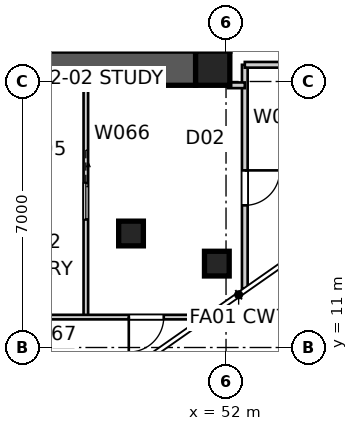
"""IFC4 building model, lengths in metres.
Left out: names, types, materials, properties, quantities, classifications, styles, units other than length and angle.
Written with IfcOpenShell. Run it as: python <this file> out.ifc"""

import sys

from ifc_helpers import new_model, si_unit, direction, frame, frame_2d, origin, origin_2d, place, context, subcontext, project, spatial, polyline, rectangle, outline, extrude, element, fill, save


model = new_model("IFC4")
c1 = context("Model", 3, precision=1e-05, world=origin(), true_north=direction((0.0, 1.0)))
c2 = subcontext(c1, "Body", "Model", "MODEL_VIEW")
j1 = project(units=[si_unit("LENGTHUNIT", "METRE"), si_unit("PLANEANGLEUNIT", "RADIAN")], contexts=[c1])
p1 = place(None, origin())
s1 = spatial("IfcSite", under=j1, at=p1, CompositionType="ELEMENT")
p2 = place(p1, origin())
s2 = spatial("IfcBuilding", under=s1, at=p2, CompositionType="ELEMENT")
p3 = place(p2, frame((0.0, 0.0, 260.8)))
s3 = spatial("IfcBuildingStorey", under=s2, at=p3, CompositionType="ELEMENT", Elevation=260.8)
p4 = place(p3, frame((51.2, 18.35, 0.0), z_axis=(0.0, 0.0, 1.0), x_axis=(-1.0, 0.0, 0.0)))
e1 = element("IfcWall", 1, at=p4, inside=s3, PredefinedType="SHEAR", context=c2, shape_type="SweptSolid", body=[
    extrude(outline(polyline([(0.0, -0.45), (22.4, -0.45), (22.4, -0.025), (22.85, -0.025), (22.85, 0.025), (22.4, 0.025), (22.4, 0.45), (0.0, 0.45), (0.0, 0.025), (-0.45, 0.025), (-0.45, -0.025), (0.0, -0.025), (0.0, -0.45)])), origin(), (0.0, 0.0, 1.0), 3.4),
])
p5 = place(p3, frame((51.65, 18.8, 0.0), z_axis=(0.0, 0.0, 1.0), x_axis=(0.0, 1.0, 0.0)))
e2 = element("IfcWall", 2, at=p5, inside=s3, PredefinedType="SHEAR", context=c2, shape_type="SweptSolid", body=[
    extrude(outline(polyline([(0.0, -0.45), (22.4, -0.45), (22.4, -0.025), (22.85, -0.025), (22.85, 0.025), (22.4, 0.025), (22.4, 0.45), (0.0, 0.45), (0.0, 0.025), (-0.45, 0.025), (-0.45, -0.025), (0.0, -0.025), (0.0, -0.45)])), origin(), (0.0, 0.0, 1.0), 3.4),
])
p6 = place(p5, frame((11.14, 0.0, 0.0)))
e3 = element("IfcOpeningElement", 3, at=p6, cuts=e2, PredefinedType="OPENING", context=c2, shape_type="SweptSolid", body=[
    extrude(rectangle(XDim=1.02, YDim=2.4, at=frame_2d((0.51, 1.2))), frame((0.0, 0.46, 0.0), z_axis=(0.0, -1.0, 0.0), x_axis=(1.0, 0.0, 0.0)), (0.0, 0.0, 1.0), 0.92),
])
p7 = place(p3, frame((51.65, 18.35, 0.0), z_axis=(0.0, 0.0, 1.0), x_axis=(1.0, 0.0, 0.0)))
e4 = element("IfcColumn", 4, at=p7, inside=s3, PredefinedType="COLUMN", context=c2, shape_type="SweptSolid", body=[
    extrude(rectangle(XDim=0.9, YDim=0.9, at=origin_2d()), origin(), (0.0, 0.0, 1.0), 3.4),
])
for number, where, z_axis, x_axis in (
    (5, (51.758, 13.207, 0.0), (0.0, 0.0, 1.0), (1.0, 0.0, 0.0)),
    (6, (49.5, 14.0, 0.0), (0.0, 0.0, 1.0), (1.0, 0.0, 0.0)),
):
    element("IfcColumn", number, at=place(p3, frame(where, z_axis=z_axis, x_axis=x_axis)), inside=s3, PredefinedType="COLUMN", context=c2, shape_type="SweptSolid", body=[
        extrude(rectangle(XDim=0.65, YDim=0.65, at=origin_2d()), origin(), (0.0, 0.0, 1.0), 3.4),
    ])
p8 = place(p3, frame((48.311, 17.9, 0.0), z_axis=(0.0, 0.0, 1.0), x_axis=(0.0, -1.0, 0.0)))
e7 = element("IfcWall", 7, at=p8, inside=s3, PredefinedType="PARTITIONING", context=c2, shape_type="SweptSolid", body=[
    extrude(rectangle(XDim=6.1, YDim=0.12, at=frame_2d((3.05, 0.0))), origin(), (0.0, 0.0, 1.0), 3.25),
])
p9 = place(p8, frame((2.57, 0.0, 0.0)))
e8 = element("IfcOpeningElement", 8, at=p9, cuts=e7, PredefinedType="OPENING", context=c2, shape_type="SweptSolid", body=[
    extrude(rectangle(XDim=0.96, YDim=2.1, at=frame_2d((0.48, 1.05))), frame((0.0, 0.07, 0.0), z_axis=(0.0, -1.0, 0.0), x_axis=(1.0, 0.0, 0.0)), (0.0, 0.0, 1.0), 0.14),
])
p10 = place(p3, frame((51.422, 11.8, 0.0), z_axis=(0.0, 0.0, 1.0), x_axis=(-1.0, 0.0, 0.0)))
e9 = element("IfcWall", 9, at=p10, inside=s3, PredefinedType="PARTITIONING", context=c2, shape_type="SweptSolid", body=[
    extrude(rectangle(XDim=6.213, YDim=0.12, at=frame_2d((3.106, 0.0))), origin(), (0.0, 0.0, 1.0), 3.25),
])
p11 = place(p10, frame((1.061, 0.0, 0.0)))
e10 = element("IfcOpeningElement", 10, at=p11, cuts=e9, PredefinedType="OPENING", context=c2, shape_type="SweptSolid", body=[
    extrude(rectangle(XDim=0.92, YDim=2.1, at=frame_2d((0.46, 1.05))), frame((0.0, 0.07, 0.0), z_axis=(0.0, -1.0, 0.0), x_axis=(1.0, 0.0, 0.0)), (0.0, 0.0, 1.0), 0.14),
])
p12 = place(p3, frame((52.494, 18.439, 0.0), z_axis=(0.0, 0.0, 1.0), x_axis=(0.0, -1.0, 0.0)))
e11 = element("IfcWall", 11, at=p12, inside=s3, PredefinedType="SOLIDWALL", context=c2, shape_type="SweptSolid", body=[
    extrude(rectangle(XDim=5.888, YDim=0.15, at=frame_2d((2.944, 0.0))), origin(), (0.0, 0.0, 1.0), 3.25),
])
p13 = place(p12, frame((2.778, 0.0, 0.0)))
e12 = element("IfcOpeningElement", 12, at=p13, cuts=e11, PredefinedType="OPENING", context=c2, shape_type="SweptSolid", body=[
    extrude(rectangle(XDim=0.92, YDim=2.34, at=frame_2d((0.46, 1.17))), frame((0.0, 0.085, 0.0), z_axis=(0.0, -1.0, 0.0), x_axis=(1.0, 0.0, 0.0)), (0.0, 0.0, 1.0), 0.17),
])
p14 = place(p3, frame((52.05, 17.9, 0.0), z_axis=(0.0, 0.0, 1.0), x_axis=(1.0, 0.0, 0.0)))
e13 = element("IfcWall", 13, at=p14, inside=s3, PredefinedType="SOLIDWALL", context=c2, shape_type="SweptSolid", body=[
    extrude(rectangle(XDim=0.444, YDim=0.15, at=frame_2d((0.222, 0.0))), origin(), (0.0, 0.0, 1.0), 3.25),
])
p15 = place(p3, frame((52.494, 18.439, 0.0), z_axis=(0.0, 0.0, 1.0), x_axis=(1.0, 0.0, 0.0)))
e14 = element("IfcWall", 14, at=p15, inside=s3, PredefinedType="SOLIDWALL", context=c2, shape_type="SweptSolid", body=[
    extrude(rectangle(XDim=5.706, YDim=0.15, at=frame_2d((2.853, 0.0))), origin(), (0.0, 0.0, 1.0), 3.25),
])
p16 = place(p15, frame((2.393, 0.0, 0.0)))
e15 = element("IfcOpeningElement", 15, at=p16, cuts=e14, PredefinedType="OPENING", context=c2, shape_type="SweptSolid", body=[
    extrude(rectangle(XDim=0.92, YDim=2.34, at=frame_2d((0.46, 1.17))), frame((0.0, 0.085, 0.0), z_axis=(0.0, -1.0, 0.0), x_axis=(1.0, 0.0, 0.0)), (0.0, 0.0, 1.0), 0.17),
])
p17 = place(p13, origin())
e16 = element("IfcDoor", 16, at=p17, inside=s3, OperationType="SINGLE_SWING_LEFT", PredefinedType="DOOR", context=c2, shape_type="SweptSolid", body=[
    extrude(rectangle(XDim=0.92, YDim=2.34, at=frame_2d((0.46, 1.17))), frame((0.0, 0.025, 0.0), z_axis=(0.0, -1.0, 0.0), x_axis=(1.0, 0.0, 0.0)), (0.0, 0.0, 1.0), 0.05),
])
fill(e12, e16)
p18 = place(p9, origin())
e17 = element("IfcDoor", 17, at=p18, inside=s3, OperationType="SLIDING_TO_LEFT", PredefinedType="DOOR", context=c2, shape_type="SweptSolid", body=[
    extrude(rectangle(XDim=0.96, YDim=2.1, at=frame_2d((0.48, 1.05))), frame((0.0, 0.025, 0.0), z_axis=(0.0, -1.0, 0.0), x_axis=(1.0, 0.0, 0.0)), (0.0, 0.0, 1.0), 0.05),
])
fill(e8, e17)
p19 = place(p11, origin())
e18 = element("IfcDoor", 18, at=p19, inside=s3, OperationType="SINGLE_SWING_RIGHT", PredefinedType="DOOR", context=c2, shape_type="SweptSolid", body=[
    extrude(rectangle(XDim=0.92, YDim=2.1, at=frame_2d((0.46, 1.05))), frame((0.0, 0.025, 0.0), z_axis=(0.0, -1.0, 0.0), x_axis=(1.0, 0.0, 0.0)), (0.0, 0.0, 1.0), 0.05),
])
fill(e10, e18)
save(model, sys.argv[1])
